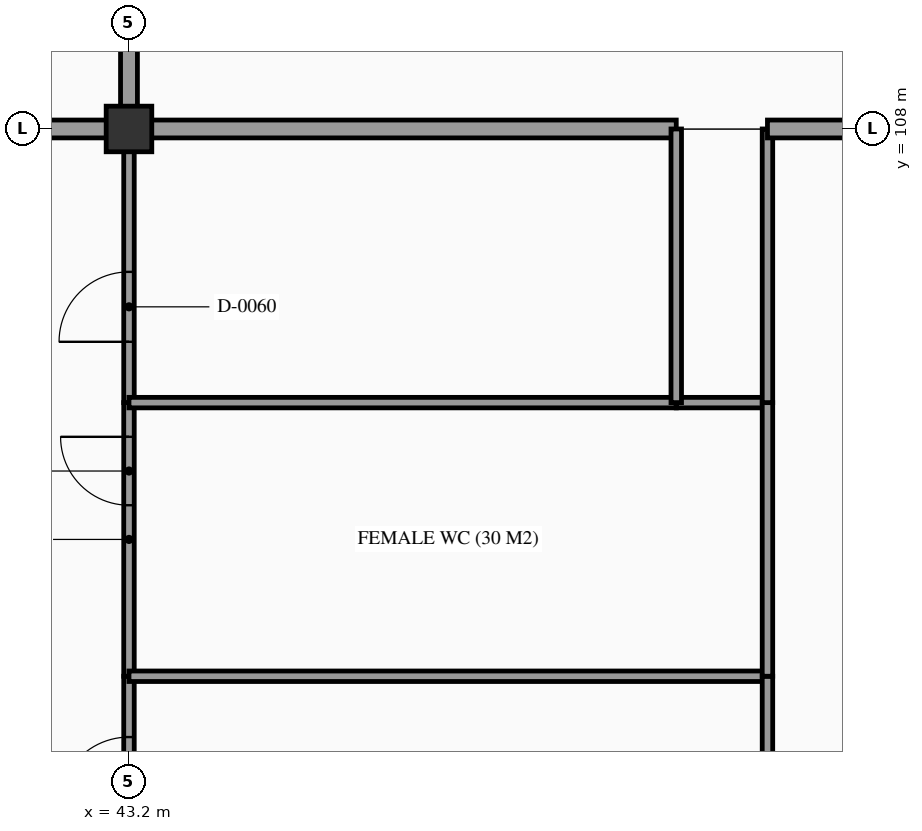
"""IFC4 building model, lengths in metres.
Left out: names, types, materials, properties, quantities, classifications, styles, units other than length and angle.
Written with IfcOpenShell. Run it as: python <this file> out.ifc"""

import sys

from ifc_helpers import new_model, si_unit, direction, frame, frame_2d, origin, origin_2d, place, context, subcontext, project, spatial, rectangle, extrude, element, fill, save


model = new_model("IFC4")
c1 = context("Model", 3, precision=1e-05, world=origin(), true_north=direction((0.0, 1.0)))
c2 = subcontext(c1, "Body", "Model", "MODEL_VIEW")
j1 = project(units=[si_unit("LENGTHUNIT", "METRE"), si_unit("PLANEANGLEUNIT", "RADIAN")], contexts=[c1])
p1 = place(None, origin())
s1 = spatial("IfcSite", under=j1, at=p1, CompositionType="ELEMENT")
p2 = place(p1, origin())
s2 = spatial("IfcBuilding", under=s1, at=p2, CompositionType="ELEMENT")
p3 = place(p2, frame((0.0, 0.0, 5.4)))
s3 = spatial("IfcBuildingStorey", under=s2, at=p3, CompositionType="ELEMENT", Elevation=5.4)
p4 = place(p3, frame((43.2, 108.0, 0.0), z_axis=(0.0, 0.0, 1.0), x_axis=(1.0, 0.0, 0.0)))
e1 = element("IfcColumn", 1, at=p4, inside=s3, PredefinedType="COLUMN", context=c2, shape_type="SweptSolid", body=[
    extrude(rectangle(XDim=0.6, YDim=0.6, at=origin_2d()), origin(), (0.0, 0.0, 1.0), 4.68),
])
p5 = place(p3, frame((43.2, 97.2, 0.0), z_axis=(0.0, 0.0, 1.0), x_axis=(0.0, 1.0, 0.0)))
e2 = element("IfcWall", 2, at=p5, inside=s3, PredefinedType="PARTITIONING", context=c2, shape_type="SweptSolid", body=[
    extrude(rectangle(XDim=3.6, YDim=0.138, at=frame_2d((1.8, 0.0))), origin(), (0.0, 0.0, 1.0), 3.23),
])
p6 = place(p5, frame((1.88, 0.0, 0.0)))
e3 = element("IfcOpeningElement", 3, at=p6, cuts=e2, PredefinedType="OPENING", context=c2, shape_type="SweptSolid", body=[
    extrude(rectangle(XDim=0.92, YDim=2.14, at=frame_2d((0.46, 1.07))), frame((0.0, 0.079, 0.0), z_axis=(0.0, -1.0, 0.0), x_axis=(1.0, 0.0, 0.0)), (0.0, 0.0, 1.0), 0.158),
])
p7 = place(p3, frame((43.2, 100.8, 0.0), z_axis=(0.0, 0.0, 1.0), x_axis=(0.0, 1.0, 0.0)))
e4 = element("IfcWall", 4, at=p7, inside=s3, PredefinedType="PARTITIONING", context=c2, shape_type="SweptSolid", body=[
    extrude(rectangle(XDim=3.6, YDim=0.138, at=frame_2d((1.8, 0.0))), origin(), (0.0, 0.0, 1.0), 3.23),
])
p8 = place(p7, frame((2.25, 0.0, 0.0)))
e5 = element("IfcOpeningElement", 5, at=p8, cuts=e4, PredefinedType="OPENING", context=c2, shape_type="SweptSolid", body=[
    extrude(rectangle(XDim=0.9, YDim=2.1, at=frame_2d((0.45, 1.05))), frame((0.0, 0.079, 0.0), z_axis=(0.0, -1.0, 0.0), x_axis=(1.0, 0.0, 0.0)), (0.0, 0.0, 1.0), 0.158),
])
p9 = place(p3, frame((43.2, 104.4, 0.0), z_axis=(0.0, 0.0, 1.0), x_axis=(0.0, 1.0, 0.0)))
e6 = element("IfcWall", 6, at=p9, inside=s3, PredefinedType="PARTITIONING", context=c2, shape_type="SweptSolid", body=[
    extrude(rectangle(XDim=3.6, YDim=0.138, at=frame_2d((1.8, 0.0))), origin(), (0.0, 0.0, 1.0), 3.23),
])
p10 = place(p9, frame((0.8, 0.0, 0.0)))
e7 = element("IfcOpeningElement", 7, at=p10, cuts=e6, PredefinedType="OPENING", context=c2, shape_type="SweptSolid", body=[
    extrude(rectangle(XDim=0.92, YDim=2.14, at=frame_2d((0.46, 1.07))), frame((0.0, 0.079, 0.0), z_axis=(0.0, -1.0, 0.0), x_axis=(1.0, 0.0, 0.0)), (0.0, 0.0, 1.0), 0.158),
])
p11 = place(p3, frame((39.6, 108.0, 0.0), z_axis=(0.0, 0.0, 1.0), x_axis=(1.0, 0.0, 0.0)))
e8 = element("IfcWall", 8, at=p11, inside=s3, PredefinedType="PARTITIONING", context=c2, shape_type="SweptSolid", body=[
    extrude(rectangle(XDim=3.6, YDim=0.235, at=frame_2d((1.8, 0.0))), origin(), (0.0, 0.0, 1.0), 3.23),
])
p12 = place(p3, frame((43.2, 100.8, 0.0), z_axis=(0.0, 0.0, 1.0), x_axis=(1.0, 0.0, 0.0)))
e9 = element("IfcWall", 9, at=p12, inside=s3, PredefinedType="PARTITIONING", context=c2, shape_type="SweptSolid", body=[
    extrude(rectangle(XDim=8.4, YDim=0.138, at=frame_2d((4.2, 0.0))), origin(), (0.0, 0.0, 1.0), 3.23),
])
p13 = place(p3, frame((43.2, 104.4, 0.0), z_axis=(0.0, 0.0, 1.0), x_axis=(1.0, 0.0, 0.0)))
e10 = element("IfcWall", 10, at=p13, inside=s3, PredefinedType="PARTITIONING", context=c2, shape_type="SweptSolid", body=[
    extrude(rectangle(XDim=7.2, YDim=0.138, at=frame_2d((3.6, 0.0))), origin(), (0.0, 0.0, 1.0), 3.23),
])
p14 = place(p3, frame((43.2, 108.0, 0.0), z_axis=(0.0, 0.0, 1.0), x_axis=(1.0, 0.0, 0.0)))
e11 = element("IfcWall", 11, at=p14, inside=s3, PredefinedType="PARTITIONING", context=c2, shape_type="SweptSolid", body=[
    extrude(rectangle(XDim=7.2, YDim=0.235, at=frame_2d((3.6, 0.0))), origin(), (0.0, 0.0, 1.0), 3.23),
])
p15 = place(p3, frame((43.2, 108.0, 0.0), z_axis=(0.0, 0.0, 1.0), x_axis=(0.0, 1.0, 0.0)))
e12 = element("IfcWall", 12, at=p15, inside=s3, PredefinedType="PARTITIONING", context=c2, shape_type="SweptSolid", body=[
    extrude(rectangle(XDim=10.2, YDim=0.222, at=frame_2d((5.1, 0.0))), origin(), (0.0, 0.0, 1.0), 3.23),
])
p16 = place(p3, frame((50.4, 104.4, 0.0), z_axis=(0.0, 0.0, 1.0), x_axis=(1.0, 0.0, 0.0)))
e13 = element("IfcWall", 13, at=p16, inside=s3, PredefinedType="PARTITIONING", context=c2, shape_type="SweptSolid", body=[
    extrude(rectangle(XDim=1.2, YDim=0.138, at=frame_2d((0.6, 0.0))), origin(), (0.0, 0.0, 1.0), 3.23),
])
for number, where, z_axis, x_axis in (
    (14, (50.4, 104.4, 0.0), (0.0, 0.0, 1.0), (0.0, 1.0, 0.0)),
    (15, (51.6, 97.2, 0.0), (0.0, 0.0, 1.0), (0.0, 1.0, 0.0)),
):
    element("IfcWall", number, at=place(p3, frame(where, z_axis=z_axis, x_axis=x_axis)), inside=s3, PredefinedType="PARTITIONING", context=c2, shape_type="SweptSolid", body=[
        extrude(rectangle(XDim=3.6, YDim=0.138, at=frame_2d((1.8, 0.0))), origin(), (0.0, 0.0, 1.0), 3.23),
    ])
p17 = place(p3, frame((51.6, 100.8, 0.0), z_axis=(0.0, 0.0, 1.0), x_axis=(0.0, 1.0, 0.0)))
e16 = element("IfcWall", 16, at=p17, inside=s3, PredefinedType="PARTITIONING", context=c2, shape_type="SweptSolid", body=[
    extrude(rectangle(XDim=3.6, YDim=0.138, at=frame_2d((1.8, 0.0))), origin(), (0.0, 0.0, 1.0), 3.23),
])
p18 = place(p3, frame((51.6, 104.4, 0.0), z_axis=(0.0, 0.0, 1.0), x_axis=(0.0, 1.0, 0.0)))
e17 = element("IfcWall", 17, at=p18, inside=s3, PredefinedType="PARTITIONING", context=c2, shape_type="SweptSolid", body=[
    extrude(rectangle(XDim=3.6, YDim=0.138, at=frame_2d((1.8, 0.0))), origin(), (0.0, 0.0, 1.0), 3.23),
])
p19 = place(p3, frame((51.6, 108.0, 0.0), z_axis=(0.0, 0.0, 1.0), x_axis=(1.0, 0.0, 0.0)))
e18 = element("IfcWall", 18, at=p19, inside=s3, PredefinedType="PARTITIONING", context=c2, shape_type="SweptSolid", body=[
    extrude(rectangle(XDim=13.2, YDim=0.235, at=frame_2d((6.6, 0.0))), origin(), (0.0, 0.0, 1.0), 3.23),
])
p20 = place(p6, origin())
e19 = element("IfcDoor", 19, at=p20, inside=s3, OperationType="SINGLE_SWING_LEFT", PredefinedType="DOOR", context=c2, shape_type="SweptSolid", body=[
    extrude(rectangle(XDim=0.92, YDim=2.14, at=frame_2d((0.46, 1.07))), frame((0.0, 0.025, 0.0), z_axis=(0.0, -1.0, 0.0), x_axis=(1.0, 0.0, 0.0)), (0.0, 0.0, 1.0), 0.05),
])
fill(e3, e19)
p21 = place(p8, origin())
e20 = element("IfcDoor", 20, at=p21, inside=s3, OperationType="SINGLE_SWING_RIGHT", PredefinedType="DOOR", context=c2, shape_type="SweptSolid", body=[
    extrude(rectangle(XDim=0.9, YDim=2.1, at=frame_2d((0.45, 1.05))), frame((0.0, 0.025, 0.0), z_axis=(0.0, -1.0, 0.0), x_axis=(1.0, 0.0, 0.0)), (0.0, 0.0, 1.0), 0.05),
])
fill(e5, e20)
p22 = place(p10, frame((0.92, 0.0, 0.0), z_axis=(0.0, 0.0, 1.0), x_axis=(-1.0, 0.0, 0.0)))
e21 = element("IfcDoor", 21, at=p22, inside=s3, OperationType="SINGLE_SWING_LEFT", PredefinedType="DOOR", context=c2, shape_type="SweptSolid", body=[
    extrude(rectangle(XDim=0.92, YDim=2.14, at=frame_2d((0.46, 1.07))), frame((0.0, 0.025, 0.0), z_axis=(0.0, -1.0, 0.0), x_axis=(1.0, 0.0, 0.0)), (0.0, 0.0, 1.0), 0.05),
])
fill(e7, e21)
save(model, sys.argv[1])
